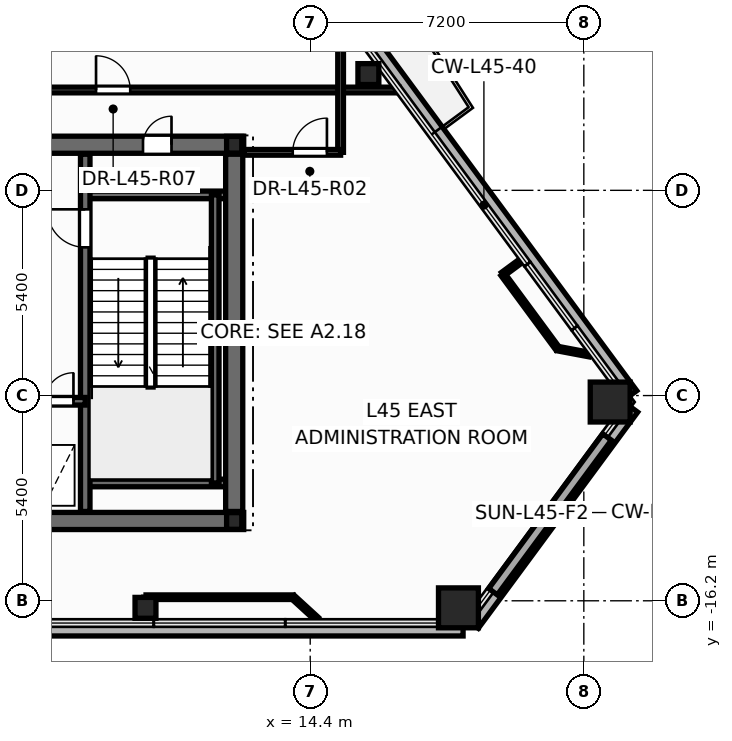
"""IFC4 building model, lengths in metres.
Left out: names, types, materials, properties, quantities, classifications, styles, units other than length and angle.
Written with IfcOpenShell. Run it as: python <this file> out.ifc"""

import sys

from ifc_helpers import new_model, si_unit, direction, frame, frame_2d, origin, origin_2d, place, context, subcontext, project, spatial, rectangle, hollow_rectangle, hollow_circle, i_section, extrude, element, fill, save


model = new_model("IFC4")
c1 = context("Model", 3, precision=1e-05, world=origin(), true_north=direction((0.0, 1.0)))
c2 = subcontext(c1, "Body", "Model", "MODEL_VIEW")
j1 = project(units=[si_unit("LENGTHUNIT", "METRE"), si_unit("PLANEANGLEUNIT", "RADIAN")], contexts=[c1])
p1 = place(None, origin())
s1 = spatial("IfcSite", under=j1, at=p1, CompositionType="ELEMENT")
p2 = place(p1, origin())
s2 = spatial("IfcBuilding", under=s1, at=p2, CompositionType="ELEMENT")
p3 = place(p2, frame((0.0, 0.0, 173.7)))
s3 = spatial("IfcBuildingStorey", under=s2, at=p3, CompositionType="ELEMENT", Elevation=173.7)
for number, where, z_axis, x_axis in (
    (1, (18.301, -16.385, 0.0), (0.0, 0.0, 1.0), (1.0, 0.0, 0.0)),
    (2, (22.294, -10.97, 0.0), (0.0, 0.0, 1.0), (1.0, 0.0, 0.0)),
):
    element("IfcColumn", number, at=place(p3, frame(where, z_axis=z_axis, x_axis=x_axis)), inside=s3, PredefinedType="COLUMN", context=c2, shape_type="SweptSolid", body=[
        extrude(hollow_rectangle(XDim=1.05, YDim=1.05, WallThickness=0.045, at=origin_2d()), origin(), (0.0, 0.0, 1.0), 4.8),
    ])
for number, where, z_axis, x_axis in (
    (3, (10.065, -16.385, 0.0), (0.0, 0.0, 1.0), (1.0, 0.0, 0.0)),
    (4, (15.931, -2.341, 0.0), (0.0, 0.0, 1.0), (1.0, 0.0, 0.0)),
):
    element("IfcColumn", number, at=place(p3, frame(where, z_axis=z_axis, x_axis=x_axis)), inside=s3, PredefinedType="COLUMN", context=c2, shape_type="SweptSolid", body=[
        extrude(hollow_circle(Radius=0.275, WallThickness=0.024, at=origin_2d()), origin(), (0.0, 0.0, 1.0), 4.8),
    ])
for number, where, z_axis, x_axis in (
    (5, (12.4, -14.1, 0.0), (0.0, 0.0, 1.0), (1.0, 0.0, 0.0)),
    (6, (12.4, -4.2, 0.0), (0.0, 0.0, 1.0), (1.0, 0.0, 0.0)),
):
    element("IfcColumn", number, at=place(p3, frame(where, z_axis=z_axis, x_axis=x_axis)), inside=s3, PredefinedType="COLUMN", context=c2, shape_type="SweptSolid", body=[
        extrude(i_section(OverallWidth=0.4, OverallDepth=0.44, WebThickness=0.028, FlangeThickness=0.04, at=origin_2d()), origin(), (0.0, 0.0, 1.0), 4.8),
    ])
p4 = place(p3, frame((-18.423, -16.946, -0.2), z_axis=(0.0, 0.0, 1.0), x_axis=(1.0, 0.0, 0.0)))
e7 = element("IfcWall", 7, at=p4, inside=s3, PredefinedType="PARAPET", context=c2, shape_type="SweptSolid", body=[
    extrude(rectangle(XDim=36.845, YDim=0.36, at=frame_2d((18.423, 0.0))), origin(), (0.0, 0.0, 1.0), 0.38),
])
p5 = place(p3, frame((18.679, -16.816, -0.2), z_axis=(0.0, 0.0, 1.0), x_axis=(0.593500739661, 0.804833443653, 0.0)))
e8 = element("IfcWall", 8, at=p5, inside=s3, PredefinedType="PARAPET", context=c2, shape_type="SweptSolid", body=[
    extrude(rectangle(XDim=7.065, YDim=0.36, at=frame_2d((3.533, 0.0))), origin(), (0.0, 0.0, 1.0), 0.38),
])
p6 = place(p3, frame((22.848, -10.779, -0.2), z_axis=(0.0, 0.0, 1.0), x_axis=(-0.593477838776, 0.804850330734, 0.0)))
e9 = element("IfcWall", 9, at=p6, inside=s3, PredefinedType="PARAPET", context=c2, shape_type="SweptSolid", body=[
    extrude(rectangle(XDim=12.634, YDim=0.36, at=frame_2d((6.317, 0.0))), origin(), (0.0, 0.0, 1.0), 0.38),
])
p7 = place(p3, frame((-12.65, -14.1, 0.0), z_axis=(0.0, 0.0, 1.0), x_axis=(1.0, 0.0, 0.0)))
e10 = element("IfcWall", 10, at=p7, inside=s3, PredefinedType="SHEAR", context=c2, shape_type="SweptSolid", body=[
    extrude(rectangle(XDim=25.3, YDim=0.45, at=frame_2d((12.65, 0.0))), origin(), (0.0, 0.0, 1.0), 4.8),
])
p8 = place(p3, frame((-12.65, -4.2, 0.0), z_axis=(0.0, 0.0, 1.0), x_axis=(1.0, 0.0, 0.0)))
e11 = element("IfcWall", 11, at=p8, inside=s3, PredefinedType="SHEAR", context=c2, shape_type="SweptSolid", body=[
    extrude(rectangle(XDim=25.3, YDim=0.45, at=frame_2d((12.65, 0.0))), origin(), (0.0, 0.0, 1.0), 4.8),
])
p9 = place(p8, frame((1.85, 0.0, 0.0)))
e12 = element("IfcOpeningElement", 12, at=p9, cuts=e11, PredefinedType="OPENING", context=c2, shape_type="SweptSolid", body=[
    extrude(rectangle(XDim=0.756, YDim=2.054, at=frame_2d((0.375, 1.027))), frame((0.0, 0.235, 0.0), z_axis=(0.0, -1.0, 0.0), x_axis=(1.0, 0.0, 0.0)), (0.0, 0.0, 1.0), 0.47),
])
p10 = place(p8, frame((22.65, 0.0, 0.0)))
e13 = element("IfcOpeningElement", 13, at=p10, cuts=e11, PredefinedType="OPENING", context=c2, shape_type="SweptSolid", body=[
    extrude(rectangle(XDim=0.756, YDim=2.054, at=frame_2d((0.375, 1.027))), frame((0.0, 0.235, 0.0), z_axis=(0.0, -1.0, 0.0), x_axis=(1.0, 0.0, 0.0)), (0.0, 0.0, 1.0), 0.47),
])
p11 = place(p8, frame((5.85, 0.0, 0.0)))
e14 = element("IfcOpeningElement", 14, at=p11, cuts=e11, PredefinedType="OPENING", context=c2, shape_type="SweptSolid", body=[
    extrude(rectangle(XDim=1.006, YDim=2.104, at=frame_2d((0.5, 1.052))), frame((0.0, 0.235, 0.0), z_axis=(0.0, -1.0, 0.0), x_axis=(1.0, 0.0, 0.0)), (0.0, 0.0, 1.0), 0.47),
])
p12 = place(p8, frame((10.35, 0.0, 0.0)))
e15 = element("IfcOpeningElement", 15, at=p12, cuts=e11, PredefinedType="OPENING", context=c2, shape_type="SweptSolid", body=[
    extrude(rectangle(XDim=1.406, YDim=2.154, at=frame_2d((0.7, 1.077))), frame((0.0, 0.235, 0.0), z_axis=(0.0, -1.0, 0.0), x_axis=(1.0, 0.0, 0.0)), (0.0, 0.0, 1.0), 0.47),
])
p13 = place(p8, frame((18.45, 0.0, 0.0)))
e16 = element("IfcOpeningElement", 16, at=p13, cuts=e11, PredefinedType="OPENING", context=c2, shape_type="SweptSolid", body=[
    extrude(rectangle(XDim=1.006, YDim=2.104, at=frame_2d((0.5, 1.052))), frame((0.0, 0.235, 0.0), z_axis=(0.0, -1.0, 0.0), x_axis=(1.0, 0.0, 0.0)), (0.0, 0.0, 1.0), 0.47),
])
for number, where, z_axis, x_axis in (
    (17, (8.48, -5.52, 0.0), (0.0, 0.0, 1.0), (1.0, 0.0, 0.0)),
    (18, (8.48, -13.1, 0.0), (0.0, 0.0, 1.0), (1.0, 0.0, 0.0)),
):
    element("IfcWall", number, at=place(p3, frame(where, z_axis=z_axis, x_axis=x_axis)), inside=s3, PredefinedType="SOLIDWALL", context=c2, shape_type="SweptSolid", body=[
        extrude(rectangle(XDim=3.87, YDim=0.2, at=frame_2d((1.935, 0.0))), origin(), (0.0, 0.0, 1.0), 4.8),
    ])
p14 = place(p3, frame((11.9, -13.1, 0.0), z_axis=(0.0, 0.0, 1.0), x_axis=(0.0, 1.0, 0.0)))
e19 = element("IfcWall", 19, at=p14, inside=s3, PredefinedType="SOLIDWALL", context=c2, shape_type="SweptSolid", body=[
    extrude(rectangle(XDim=7.58, YDim=0.2, at=frame_2d((3.79, 0.0))), origin(), (0.0, 0.0, 1.0), 4.8),
])
p15 = place(p3, frame((8.48, -13.85, 0.0), z_axis=(0.0, 0.0, 1.0), x_axis=(0.0, 1.0, 0.0)))
e20 = element("IfcWall", 20, at=p15, inside=s3, PredefinedType="SHEAR", context=c2, shape_type="SweptSolid", body=[
    extrude(rectangle(XDim=9.4, YDim=0.25, at=frame_2d((4.7, 0.0))), origin(), (0.0, 0.0, 1.0), 4.8),
])
p16 = place(p15, frame((6.95, 0.0, 0.0)))
e21 = element("IfcOpeningElement", 21, at=p16, cuts=e20, PredefinedType="OPENING", context=c2, shape_type="SweptSolid", body=[
    extrude(rectangle(XDim=1.006, YDim=2.104, at=frame_2d((0.5, 1.052))), frame((0.0, 0.135, 0.0), z_axis=(0.0, -1.0, 0.0), x_axis=(1.0, 0.0, 0.0)), (0.0, 0.0, 1.0), 0.27),
])
p17 = place(p3, frame((5.12, -10.95, 0.0), z_axis=(0.0, 0.0, 1.0), x_axis=(1.0, 0.0, 0.0)))
e22 = element("IfcWall", 22, at=p17, inside=s3, PredefinedType="SOLIDWALL", context=c2, shape_type="SweptSolid", body=[
    extrude(rectangle(XDim=3.36, YDim=0.2, at=frame_2d((1.68, 0.0))), origin(), (0.0, 0.0, 1.0), 4.8),
])
p18 = place(p17, frame((0.42, 0.0, 0.0)))
e23 = element("IfcOpeningElement", 23, at=p18, cuts=e22, PredefinedType="OPENING", context=c2, shape_type="SweptSolid", body=[
    extrude(rectangle(XDim=1.106, YDim=2.104, at=frame_2d((0.55, 1.052))), frame((0.0, 0.11, 0.0), z_axis=(0.0, -1.0, 0.0), x_axis=(1.0, 0.0, 0.0)), (0.0, 0.0, 1.0), 0.22),
])
p19 = place(p17, frame((2.3, 0.0, 0.0)))
e24 = element("IfcOpeningElement", 24, at=p19, cuts=e22, PredefinedType="OPENING", context=c2, shape_type="SweptSolid", body=[
    extrude(rectangle(XDim=0.756, YDim=2.054, at=frame_2d((0.375, 1.027))), frame((0.0, 0.11, 0.0), z_axis=(0.0, -1.0, 0.0), x_axis=(1.0, 0.0, 0.0)), (0.0, 0.0, 1.0), 0.22),
])
p20 = place(p3, frame((12.4, -13.85, 0.0), z_axis=(0.0, 0.0, 1.0), x_axis=(0.0, 1.0, 0.0)))
e25 = element("IfcWall", 25, at=p20, inside=s3, PredefinedType="SHEAR", context=c2, shape_type="SweptSolid", body=[
    extrude(rectangle(XDim=9.4, YDim=0.45, at=frame_2d((4.7, 0.0))), origin(), (0.0, 0.0, 1.0), 4.8),
])
p21 = place(p3, frame((5.1, -2.76, 0.0), z_axis=(0.0, 0.0, 1.0), x_axis=(1.0, 0.0, 0.0)))
e26 = element("IfcWall", 26, at=p21, inside=s3, PredefinedType="PARTITIONING", context=c2, shape_type="SweptSolid", body=[
    extrude(rectangle(XDim=11.636, YDim=0.15, at=frame_2d((5.818, 0.0))), origin(), (0.0, 0.0, 1.0), 3.525),
])
p22 = place(p21, frame((3.664, 0.0, 0.0)))
e27 = element("IfcOpeningElement", 27, at=p22, cuts=e26, PredefinedType="OPENING", context=c2, shape_type="SweptSolid", body=[
    extrude(rectangle(XDim=0.906, YDim=2.104, at=frame_2d((0.45, 1.052))), frame((0.0, 0.085, 0.0), z_axis=(0.0, -1.0, 0.0), x_axis=(1.0, 0.0, 0.0)), (0.0, 0.0, 1.0), 0.17),
])
p23 = place(p3, frame((10.08, -16.106, 0.0), z_axis=(0.0, 0.0, 1.0), x_axis=(1.0, 0.0, 0.0)))
e28 = element("IfcWall", 28, at=p23, inside=s3, PredefinedType="PARTITIONING", context=c2, shape_type="SweptSolid", body=[
    extrude(rectangle(XDim=3.868, YDim=0.12, at=frame_2d((1.934, 0.0))), origin(), (0.0, 0.0, 1.0), 3.992),
])
p24 = place(p3, frame((15.2, -4.4, 0.0), z_axis=(0.0, 0.0, 1.0), x_axis=(0.0, 1.0, 0.0)))
e29 = element("IfcWall", 29, at=p24, inside=s3, PredefinedType="PARTITIONING", context=c2, shape_type="SweptSolid", body=[
    extrude(rectangle(XDim=3.724, YDim=0.15, at=frame_2d((1.862, 0.0))), origin(), (0.0, 0.0, 1.0), 3.825),
])
p25 = place(p3, frame((12.652, -4.4, 0.0), z_axis=(0.0, 0.0, 1.0), x_axis=(1.0, 0.0, 0.0)))
e30 = element("IfcWall", 30, at=p25, inside=s3, PredefinedType="PARTITIONING", context=c2, shape_type="SweptSolid", body=[
    extrude(rectangle(XDim=2.548, YDim=0.15, at=frame_2d((1.274, 0.0))), origin(), (0.0, 0.0, 1.0), 3.525),
])
p26 = place(p25, frame((1.288, 0.0, 0.0)))
e31 = element("IfcOpeningElement", 31, at=p26, cuts=e30, PredefinedType="OPENING", context=c2, shape_type="SweptSolid", body=[
    extrude(rectangle(XDim=0.906, YDim=2.104, at=frame_2d((0.45, 1.052))), frame((0.0, 0.085, 0.0), z_axis=(0.0, -1.0, 0.0), x_axis=(1.0, 0.0, 0.0)), (0.0, 0.0, 1.0), 0.17),
])
p27 = place(p3, frame((20.909, -9.564, 0.0), z_axis=(0.0, 0.0, 1.0), x_axis=(-0.593469747426, 0.804856297043, 0.0)))
e32 = element("IfcWall", 32, at=p27, inside=s3, PredefinedType="PARTITIONING", context=c2, shape_type="SweptSolid", body=[
    extrude(rectangle(XDim=2.43, YDim=0.12, at=frame_2d((1.215, 0.0))), origin(), (0.0, 0.0, 1.0), 4.55),
])
for number, where, z_axis, x_axis in (
    (33, (13.948, -16.106, 0.0), (0.0, 0.0, 1.0), (0.738, -0.675, 0.0)),
    (34, (21.745, -9.722, 0.0), (0.0, 0.0, 1.0), (-0.983, 0.186, 0.0)),
):
    element("IfcWall", number, at=place(p3, frame(where, z_axis=z_axis, x_axis=x_axis)), inside=s3, PredefinedType="PARTITIONING", context=c2, shape_type="SweptSolid", body=[
        extrude(rectangle(XDim=0.851, YDim=0.12, at=frame_2d((0.425, 0.0))), origin(), (0.0, 0.0, 1.0), 3.992),
    ])
for number, where, z_axis, x_axis in (
    (35, (10.08, -16.776, 0.0), (0.0, 0.0, 1.0), (0.0, 1.0, 0.0)),
    (36, (19.467, -7.608, 0.0), (0.0, 0.0, 1.0), (0.805, 0.593, 0.0)),
):
    element("IfcWall", number, at=place(p3, frame(where, z_axis=z_axis, x_axis=x_axis)), inside=s3, PredefinedType="PARTITIONING", context=c2, shape_type="SweptSolid", body=[
        extrude(rectangle(XDim=0.67, YDim=0.12, at=frame_2d((0.335, 0.0))), origin(), (0.0, 0.0, 1.0), 3.992),
    ])
p28 = place(p16, origin())
e37 = element("IfcDoor", 37, at=p28, inside=s3, OperationType="SINGLE_SWING_RIGHT", PredefinedType="DOOR", context=c2, shape_type="SweptSolid", body=[
    extrude(rectangle(XDim=1.0, YDim=2.1, at=frame_2d((0.5, 1.05))), frame((0.0, 0.025, 0.0), z_axis=(0.0, -1.0, 0.0), x_axis=(1.0, 0.0, 0.0)), (0.0, 0.0, 1.0), 0.05),
])
fill(e21, e37)
p29 = place(p19, origin())
e38 = element("IfcDoor", 38, at=p29, inside=s3, OperationType="SINGLE_SWING_RIGHT", PredefinedType="DOOR", context=c2, shape_type="SweptSolid", body=[
    extrude(rectangle(XDim=0.75, YDim=2.05, at=frame_2d((0.375, 1.025))), frame((0.0, 0.025, 0.0), z_axis=(0.0, -1.0, 0.0), x_axis=(1.0, 0.0, 0.0)), (0.0, 0.0, 1.0), 0.05),
])
fill(e24, e38)
p30 = place(p10, origin())
e39 = element("IfcDoor", 39, at=p30, inside=s3, OperationType="SINGLE_SWING_RIGHT", PredefinedType="DOOR", context=c2, shape_type="SweptSolid", body=[
    extrude(rectangle(XDim=0.75, YDim=2.05, at=frame_2d((0.375, 1.025))), frame((0.0, 0.025, 0.0), z_axis=(0.0, -1.0, 0.0), x_axis=(1.0, 0.0, 0.0)), (0.0, 0.0, 1.0), 0.05),
])
fill(e13, e39)
p31 = place(p26, origin())
e40 = element("IfcDoor", 40, at=p31, inside=s3, OperationType="SINGLE_SWING_RIGHT", PredefinedType="DOOR", context=c2, shape_type="SweptSolid", body=[
    extrude(rectangle(XDim=0.9, YDim=2.1, at=frame_2d((0.45, 1.05))), frame((0.0, 0.025, 0.0), z_axis=(0.0, -1.0, 0.0), x_axis=(1.0, 0.0, 0.0)), (0.0, 0.0, 1.0), 0.05),
])
fill(e31, e40)
p32 = place(p22, origin())
e41 = element("IfcDoor", 41, at=p32, inside=s3, OperationType="SINGLE_SWING_LEFT", PredefinedType="DOOR", context=c2, shape_type="SweptSolid", body=[
    extrude(rectangle(XDim=0.9, YDim=2.1, at=frame_2d((0.45, 1.05))), frame((0.0, 0.025, 0.0), z_axis=(0.0, -1.0, 0.0), x_axis=(1.0, 0.0, 0.0)), (0.0, 0.0, 1.0), 0.05),
])
fill(e27, e41)
save(model, sys.argv[1])
